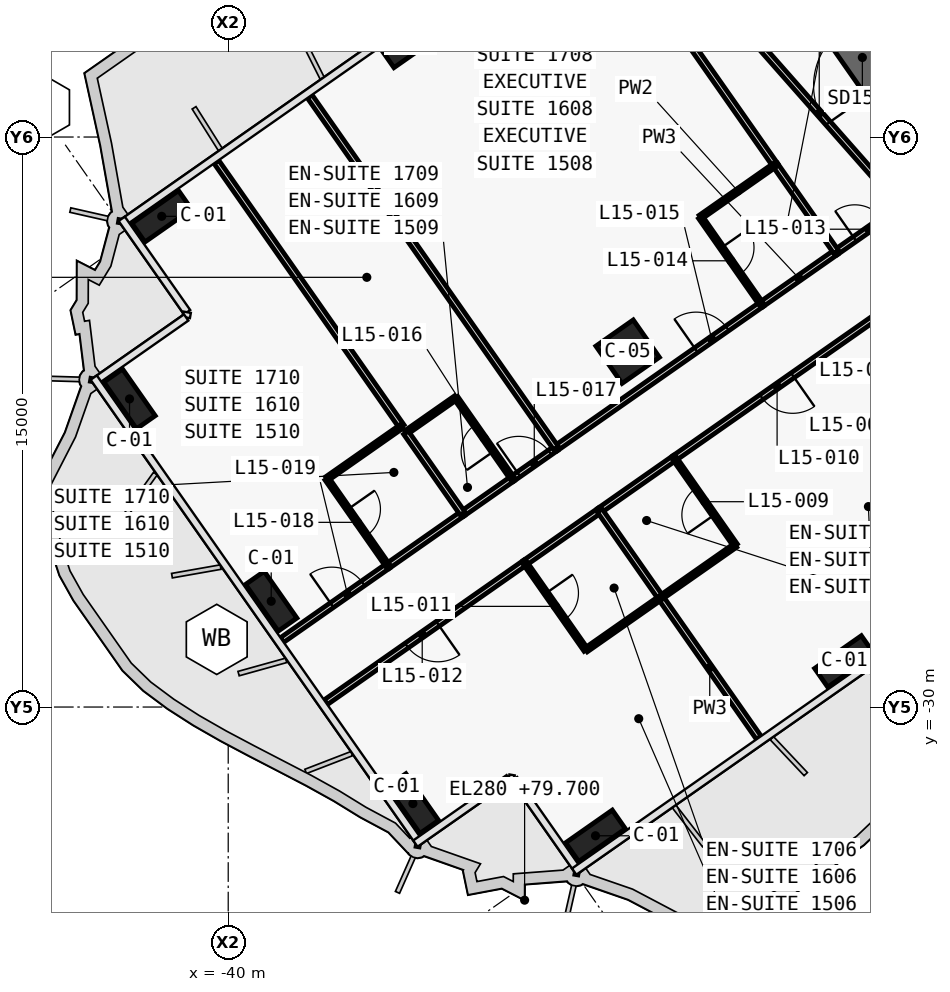
"""IFC4 building model, lengths in metres.
Left out: names, types, materials, properties, quantities, classifications, styles, units other than length and angle.
Written with IfcOpenShell. Run it as: python <this file> out.ifc"""

import sys

from ifc_helpers import new_model, si_unit, direction, frame, frame_2d, origin, origin_2d, place, context, subcontext, project, spatial, polyline, rectangle, outline, extrude, element, fill, save


model = new_model("IFC4")
c1 = context("Model", 3, precision=1e-05, world=origin(), true_north=direction((0.0, 1.0)))
c2 = subcontext(c1, "Body", "Model", "MODEL_VIEW")
j1 = project(units=[si_unit("LENGTHUNIT", "METRE"), si_unit("PLANEANGLEUNIT", "RADIAN")], contexts=[c1])
p1 = place(None, origin())
s1 = spatial("IfcSite", under=j1, at=p1, CompositionType="ELEMENT")
p2 = place(p1, origin())
s2 = spatial("IfcBuilding", under=s1, at=p2, CompositionType="ELEMENT")
p3 = place(p2, frame((0.0, 0.0, 79.7)))
s3 = spatial("IfcBuildingStorey", under=s2, at=p3, CompositionType="ELEMENT", Elevation=79.7)
p4 = place(p3, frame((-21.708, -15.2, 0.0), z_axis=(0.0, 0.0, 1.0), x_axis=(-0.573576324356, 0.819152122709, 0.0)))
e1 = element("IfcWall", 1, at=p4, inside=s3, PredefinedType="SHEAR", context=c2, shape_type="SweptSolid", body=[
    extrude(outline(polyline([(0.0, 0.5), (0.0, -0.5), (9.2, -0.5), (9.2, 0.5), (0.0, 0.5)])), origin(), (0.0, 0.0, 1.0), 3.6),
])
p5 = place(p4, frame((6.1, 0.0, 0.0)))
e2 = element("IfcOpeningElement", 2, at=p5, cuts=e1, PredefinedType="OPENING", context=c2, shape_type="SweptSolid", body=[
    extrude(rectangle(XDim=1.8, YDim=2.1, at=frame_2d((0.9, 1.05))), frame((0.0, 0.51, 0.0), z_axis=(0.0, -1.0, 0.0), x_axis=(1.0, 0.0, 0.0)), (0.0, 0.0, 1.0), 1.02),
])
p6 = place(p4, frame((1.9, 0.0, 0.0)))
e3 = element("IfcOpeningElement", 3, at=p6, cuts=e1, PredefinedType="OPENING", context=c2, shape_type="SweptSolid", body=[
    extrude(rectangle(XDim=1.8, YDim=2.1, at=frame_2d((0.9, 1.05))), frame((0.0, 0.51, 0.0), z_axis=(0.0, -1.0, 0.0), x_axis=(1.0, 0.0, 0.0)), (0.0, 0.0, 1.0), 1.02),
])
for number, where, z_axis, x_axis in (
    (4, (-23.782, -28.799, 0.0), (0.0, 0.0, 1.0), (-0.819, -0.574, 0.0)),
    (5, (-30.336, -33.388, 0.0), (0.0, 0.0, 1.0), (-0.819, -0.574, 0.0)),
    (6, (-35.197, -12.498, 0.0), (0.0, 0.0, 1.0), (-0.819, -0.574, 0.0)),
    (7, (-41.75, -17.087, 0.0), (0.0, 0.0, 1.0), (-0.819, -0.574, 0.0)),
    (8, (-35.14, -32.541, 0.0), (0.0, 0.0, 1.0), (-0.574, 0.819, 0.0)),
    (9, (-38.869, -27.216, 0.0), (0.0, 0.0, 1.0), (-0.574, 0.819, 0.0)),
    (10, (-42.597, -21.892, 0.0), (0.0, 0.0, 1.0), (-0.574, 0.819, 0.0)),
):
    element("IfcColumn", number, at=place(p3, frame(where, z_axis=z_axis, x_axis=x_axis)), inside=s3, PredefinedType="COLUMN", context=c2, shape_type="SweptSolid", body=[
        extrude(rectangle(XDim=1.5, YDim=0.6, at=origin_2d()), origin(), (0.0, 0.0, 1.0), 3.6),
    ])
p7 = place(p3, frame((-29.49, -20.649, 0.0), z_axis=(0.0, 0.0, 1.0), x_axis=(-0.819152044289, -0.573576436351, 0.0)))
e11 = element("IfcColumn", 11, at=p7, inside=s3, PredefinedType="COLUMN", context=c2, shape_type="SweptSolid", body=[
    extrude(rectangle(XDim=1.2, YDim=1.2, at=origin_2d()), origin(), (0.0, 0.0, 1.0), 3.6),
])
p8 = place(p3, frame((-24.003, -18.028, 0.0), z_axis=(0.0, 0.0, 1.0), x_axis=(0.819160859995, 0.573563846013, 0.0)))
e12 = element("IfcWall", 12, at=p8, inside=s3, PredefinedType="PARTITIONING", context=c2, shape_type="SweptSolid", body=[
    extrude(rectangle(XDim=2.098, YDim=0.15, at=frame_2d((1.049, 0.0))), origin(), (0.0, 0.0, 1.0), 3.32),
])
p9 = place(p8, frame((0.599, 0.0, 0.0)))
e13 = element("IfcOpeningElement", 13, at=p9, cuts=e12, PredefinedType="OPENING", context=c2, shape_type="SweptSolid", body=[
    extrude(rectangle(XDim=0.9, YDim=2.1, at=frame_2d((0.45, 1.05))), frame((0.0, 0.085, 0.0), z_axis=(0.0, -1.0, 0.0), x_axis=(1.0, 0.0, 0.0)), (0.0, 0.0, 1.0), 0.17),
])
p10 = place(p3, frame((-31.375, -23.19, 0.0), z_axis=(0.0, 0.0, 1.0), x_axis=(0.819171118839, 0.573549194106, 0.0)))
e14 = element("IfcWall", 14, at=p10, inside=s3, PredefinedType="PARTITIONING", context=c2, shape_type="SweptSolid", body=[
    extrude(rectangle(XDim=6.603, YDim=0.15, at=frame_2d((3.302, 0.0))), origin(), (0.0, 0.0, 1.0), 2.6),
])
p11 = place(p10, frame((4.502, 0.0, 0.0)))
e15 = element("IfcOpeningElement", 15, at=p11, cuts=e14, PredefinedType="OPENING", context=c2, shape_type="SweptSolid", body=[
    extrude(rectangle(XDim=1.0, YDim=2.1, at=frame_2d((0.5, 1.05))), frame((0.0, 0.085, 0.0), z_axis=(0.0, -1.0, 0.0), x_axis=(1.0, 0.0, 0.0)), (0.0, 0.0, 1.0), 0.17),
])
p12 = place(p3, frame((-25.969, -19.404, 0.0), z_axis=(0.0, 0.0, 1.0), x_axis=(0.819146032251, 0.573585022335, 0.0)))
e16 = element("IfcWall", 16, at=p12, inside=s3, PredefinedType="PARTITIONING", context=c2, shape_type="SweptSolid", body=[
    extrude(rectangle(XDim=2.404, YDim=0.15, at=frame_2d((1.202, 0.0))), origin(), (0.0, 0.0, 1.0), 3.32),
])
p13 = place(p3, frame((-32.521, -23.992, 0.0), z_axis=(0.0, 0.0, 1.0), x_axis=(0.819199220913, 0.573509055252, 0.0)))
e17 = element("IfcWall", 17, at=p13, inside=s3, PredefinedType="PARTITIONING", context=c2, shape_type="SweptSolid", body=[
    extrude(rectangle(XDim=1.403, YDim=0.15, at=frame_2d((0.702, 0.0))), origin(), (0.0, 0.0, 1.0), 3.32),
])
p14 = place(p13, frame((0.201, 0.0, 0.0)))
e18 = element("IfcOpeningElement", 18, at=p14, cuts=e17, PredefinedType="OPENING", context=c2, shape_type="SweptSolid", body=[
    extrude(rectangle(XDim=1.0, YDim=2.1, at=frame_2d((0.5, 1.05))), frame((0.0, 0.085, 0.0), z_axis=(0.0, -1.0, 0.0), x_axis=(1.0, 0.0, 0.0)), (0.0, 0.0, 1.0), 0.17),
])
p15 = place(p3, frame((-33.833, -24.91, 0.0), z_axis=(0.0, 0.0, 1.0), x_axis=(0.819189013667, 0.573523634986, 0.0)))
e19 = element("IfcWall", 19, at=p15, inside=s3, PredefinedType="PARTITIONING", context=c2, shape_type="SweptSolid", body=[
    extrude(rectangle(XDim=1.604, YDim=0.15, at=frame_2d((0.802, 0.0))), origin(), (0.0, 0.0, 1.0), 3.32),
])
p16 = place(p3, frame((-38.582, -28.236, 0.0), z_axis=(0.0, 0.0, 1.0), x_axis=(0.819154345195, 0.573573150303, 0.0)))
e20 = element("IfcWall", 20, at=p16, inside=s3, PredefinedType="PARTITIONING", context=c2, shape_type="SweptSolid", body=[
    extrude(rectangle(XDim=3.401, YDim=0.15, at=frame_2d((1.7, 0.0))), origin(), (0.0, 0.0, 1.0), 2.5),
])
p17 = place(p16, frame((1.6, 0.0, 0.0)))
e21 = element("IfcOpeningElement", 21, at=p17, cuts=e20, PredefinedType="OPENING", context=c2, shape_type="SweptSolid", body=[
    extrude(rectangle(XDim=1.0, YDim=2.1, at=frame_2d((0.5, 1.05))), frame((0.0, 0.085, 0.0), z_axis=(0.0, -1.0, 0.0), x_axis=(1.0, 0.0, 0.0)), (0.0, 0.0, 1.0), 0.17),
])
p18 = place(p3, frame((-35.798, -26.287, 0.0), z_axis=(0.0, 0.0, 1.0), x_axis=(0.819146032251, 0.573585022335, 0.0)))
e22 = element("IfcWall", 22, at=p18, inside=s3, PredefinedType="PARTITIONING", context=c2, shape_type="SweptSolid", body=[
    extrude(rectangle(XDim=2.404, YDim=0.15, at=frame_2d((1.202, 0.0))), origin(), (0.0, 0.0, 1.0), 3.32),
])
p19 = place(p3, frame((-22.852, -19.664, 0.0), z_axis=(0.0, 0.0, 1.0), x_axis=(-0.819141582452, -0.573591377113, 0.0)))
e23 = element("IfcWall", 23, at=p19, inside=s3, PredefinedType="PARTITIONING", context=c2, shape_type="SweptSolid", body=[
    extrude(rectangle(XDim=6.603, YDim=0.15, at=frame_2d((3.301, 0.0))), origin(), (0.0, 0.0, 1.0), 2.6),
])
p20 = place(p19, frame((2.802, 0.0, 0.0)))
e24 = element("IfcOpeningElement", 24, at=p20, cuts=e23, PredefinedType="OPENING", context=c2, shape_type="SweptSolid", body=[
    extrude(rectangle(XDim=1.0, YDim=2.1, at=frame_2d((0.5, 1.05))), frame((0.0, 0.085, 0.0), z_axis=(0.0, -1.0, 0.0), x_axis=(1.0, 0.0, 0.0)), (0.0, 0.0, 1.0), 0.17),
])
p21 = place(p3, frame((-28.259, -23.449, 0.0), z_axis=(0.0, 0.0, 1.0), x_axis=(-0.819146032251, -0.573585022335, 0.0)))
e25 = element("IfcWall", 25, at=p21, inside=s3, PredefinedType="PARTITIONING", context=c2, shape_type="SweptSolid", body=[
    extrude(rectangle(XDim=2.404, YDim=0.15, at=frame_2d((1.202, 0.0))), origin(), (0.0, 0.0, 1.0), 3.32),
])
p22 = place(p3, frame((-32.191, -26.203, 0.0), z_axis=(0.0, 0.0, 1.0), x_axis=(-0.819140526837, -0.573592884626, 0.0)))
e26 = element("IfcWall", 26, at=p22, inside=s3, PredefinedType="PARTITIONING", context=c2, shape_type="SweptSolid", body=[
    extrude(rectangle(XDim=6.401, YDim=0.15, at=frame_2d((3.201, 0.0))), origin(), (0.0, 0.0, 1.0), 2.5),
])
p23 = place(p22, frame((2.801, 0.0, 0.0)))
e27 = element("IfcOpeningElement", 27, at=p23, cuts=e26, PredefinedType="OPENING", context=c2, shape_type="SweptSolid", body=[
    extrude(rectangle(XDim=1.0, YDim=2.1, at=frame_2d((0.5, 1.05))), frame((0.0, 0.085, 0.0), z_axis=(0.0, -1.0, 0.0), x_axis=(1.0, 0.0, 0.0)), (0.0, 0.0, 1.0), 0.17),
])
p24 = place(p3, frame((-30.225, -24.826, 0.0), z_axis=(0.0, 0.0, 1.0), x_axis=(-0.819146032251, -0.573585022335, 0.0)))
e28 = element("IfcWall", 28, at=p24, inside=s3, PredefinedType="PARTITIONING", context=c2, shape_type="SweptSolid", body=[
    extrude(rectangle(XDim=2.404, YDim=0.15, at=frame_2d((1.202, 0.0))), origin(), (0.0, 0.0, 1.0), 3.32),
])
p25 = place(p3, frame((-22.284, -16.827, 0.0), z_axis=(0.0, 0.0, 1.0), x_axis=(-0.661545117561, 0.749905365651, 0.0)))
e29 = element("IfcWall", 29, at=p25, inside=s3, PredefinedType="PARTITIONING", context=c2, shape_type="SweptSolid", body=[
    extrude(rectangle(XDim=6.543, YDim=0.15, at=frame_2d((3.271, 0.0))), origin(), (0.0, 0.0, 1.0), 2.6),
])
p26 = place(p3, frame((-25.606, -15.734, 0.0), z_axis=(0.0, 0.0, 1.0), x_axis=(-0.573576058406, 0.819152308929, 0.0)))
e30 = element("IfcWall", 30, at=p26, inside=s3, PredefinedType="PARTITIONING", context=c2, shape_type="SweptSolid", body=[
    extrude(rectangle(XDim=8.501, YDim=0.15, at=frame_2d((4.25, 0.0))), origin(), (0.0, 0.0, 1.0), 2.6),
])
p27 = place(p3, frame((-24.001, -18.026, 0.0), z_axis=(0.0, 0.0, 1.0), x_axis=(-0.573596837309, 0.819137759006, 0.0)))
e31 = element("IfcWall", 31, at=p27, inside=s3, PredefinedType="PARTITIONING", context=c2, shape_type="SweptSolid", body=[
    extrude(rectangle(XDim=2.802, YDim=0.15, at=frame_2d((1.401, 0.0))), origin(), (0.0, 0.0, 1.0), 2.6),
])
p28 = place(p3, frame((-25.608, -15.732, 0.0), z_axis=(0.0, 0.0, 1.0), x_axis=(-0.819107643868, -0.573639841501, 0.0)))
e32 = element("IfcWall", 32, at=p28, inside=s3, PredefinedType="PARTITIONING", context=c2, shape_type="SweptSolid", body=[
    extrude(rectangle(XDim=2.4, YDim=0.12, at=frame_2d((1.2, 0.0))), origin(), (0.0, 0.0, 1.0), 3.32),
])
p29 = place(p3, frame((-27.574, -17.11, 0.0), z_axis=(0.0, 0.0, 1.0), x_axis=(0.573591086599, -0.819141785879, 0.0)))
e33 = element("IfcWall", 33, at=p29, inside=s3, PredefinedType="PARTITIONING", context=c2, shape_type="SweptSolid", body=[
    extrude(rectangle(XDim=2.8, YDim=0.12, at=frame_2d((1.4, 0.0))), origin(), (0.0, 0.0, 1.0), 2.6),
])
p30 = place(p29, frame((0.975, 0.0, 0.0)))
e34 = element("IfcOpeningElement", 34, at=p30, cuts=e33, PredefinedType="OPENING", context=c2, shape_type="SweptSolid", body=[
    extrude(rectangle(XDim=0.85, YDim=2.05, at=frame_2d((0.425, 1.025))), frame((0.0, 0.07, 0.0), z_axis=(0.0, -1.0, 0.0), x_axis=(1.0, 0.0, 0.0)), (0.0, 0.0, 1.0), 0.14),
])
p31 = place(p3, frame((-31.373, -23.189, 0.0), z_axis=(0.0, 0.0, 1.0), x_axis=(-0.573571089604, 0.819155788095, 0.0)))
e35 = element("IfcWall", 35, at=p31, inside=s3, PredefinedType="PARTITIONING", context=c2, shape_type="SweptSolid", body=[
    extrude(rectangle(XDim=11.3, YDim=0.15, at=frame_2d((5.65, 0.0))), origin(), (0.0, 0.0, 1.0), 2.5),
])
p32 = place(p3, frame((-32.519, -23.991, 0.0), z_axis=(0.0, 0.0, 1.0), x_axis=(-0.573537965655, 0.819178980414, 0.0)))
e36 = element("IfcWall", 36, at=p32, inside=s3, PredefinedType="PARTITIONING", context=c2, shape_type="SweptSolid", body=[
    extrude(rectangle(XDim=2.6, YDim=0.12, at=frame_2d((1.3, 0.0))), origin(), (0.0, 0.0, 1.0), 2.6),
])
p33 = place(p32, frame((0.875, 0.0, 0.0)))
e37 = element("IfcOpeningElement", 37, at=p33, cuts=e36, PredefinedType="OPENING", context=c2, shape_type="SweptSolid", body=[
    extrude(rectangle(XDim=0.85, YDim=2.05, at=frame_2d((0.425, 1.025))), frame((0.0, 0.07, 0.0), z_axis=(0.0, -1.0, 0.0), x_axis=(1.0, 0.0, 0.0)), (0.0, 0.0, 1.0), 0.14),
])
p34 = place(p3, frame((-34.012, -21.861, 0.0), z_axis=(0.0, 0.0, 1.0), x_axis=(-0.81918174131, -0.573534022273, 0.0)))
e38 = element("IfcWall", 38, at=p34, inside=s3, PredefinedType="PARTITIONING", context=c2, shape_type="SweptSolid", body=[
    extrude(rectangle(XDim=1.6, YDim=0.12, at=frame_2d((0.8, 0.0))), origin(), (0.0, 0.0, 1.0), 3.32),
])
p35 = place(p3, frame((-35.436, -22.617, 0.0), z_axis=(0.0, 0.0, 1.0), x_axis=(-0.57356256513, 0.819161756848, 0.0)))
e39 = element("IfcWall", 39, at=p35, inside=s3, PredefinedType="PARTITIONING", context=c2, shape_type="SweptSolid", body=[
    extrude(rectangle(XDim=8.501, YDim=0.15, at=frame_2d((4.25, 0.0))), origin(), (0.0, 0.0, 1.0), 2.5),
])
p36 = place(p3, frame((-33.831, -24.909, 0.0), z_axis=(0.0, 0.0, 1.0), x_axis=(-0.573537965655, 0.819178980414, 0.0)))
e40 = element("IfcWall", 40, at=p36, inside=s3, PredefinedType="PARTITIONING", context=c2, shape_type="SweptSolid", body=[
    extrude(rectangle(XDim=2.6, YDim=0.15, at=frame_2d((1.3, 0.0))), origin(), (0.0, 0.0, 1.0), 2.6),
])
p37 = place(p3, frame((-35.438, -22.615, 0.0), z_axis=(0.0, 0.0, 1.0), x_axis=(-0.819155442668, -0.573571582932, 0.0)))
e41 = element("IfcWall", 41, at=p37, inside=s3, PredefinedType="PARTITIONING", context=c2, shape_type="SweptSolid", body=[
    extrude(rectangle(XDim=2.4, YDim=0.12, at=frame_2d((1.2, 0.0))), origin(), (0.0, 0.0, 1.0), 3.32),
])
p38 = place(p3, frame((-37.404, -23.993, 0.0), z_axis=(0.0, 0.0, 1.0), x_axis=(0.573550118428, -0.819170471667, 0.0)))
e42 = element("IfcWall", 42, at=p38, inside=s3, PredefinedType="PARTITIONING", context=c2, shape_type="SweptSolid", body=[
    extrude(rectangle(XDim=2.8, YDim=0.12, at=frame_2d((1.4, 0.0))), origin(), (0.0, 0.0, 1.0), 2.6),
])
p39 = place(p38, frame((0.975, 0.0, 0.0)))
e43 = element("IfcOpeningElement", 43, at=p39, cuts=e42, PredefinedType="OPENING", context=c2, shape_type="SweptSolid", body=[
    extrude(rectangle(XDim=0.85, YDim=2.05, at=frame_2d((0.425, 1.025))), frame((0.0, 0.07, 0.0), z_axis=(0.0, -1.0, 0.0), x_axis=(1.0, 0.0, 0.0)), (0.0, 0.0, 1.0), 0.14),
])
p40 = place(p3, frame((-28.62, -27.121, 0.0), z_axis=(0.0, 0.0, 1.0), x_axis=(0.819188907105, 0.573523787192, 0.0)))
e44 = element("IfcWall", 44, at=p40, inside=s3, PredefinedType="PARTITIONING", context=c2, shape_type="SweptSolid", body=[
    extrude(rectangle(XDim=2.4, YDim=0.12, at=frame_2d((1.2, 0.0))), origin(), (0.0, 0.0, 1.0), 3.32),
])
p41 = place(p3, frame((-26.653, -25.743, 0.0), z_axis=(0.0, 0.0, 1.0), x_axis=(-0.573608623498, 0.819129505664, 0.0)))
e45 = element("IfcWall", 45, at=p41, inside=s3, PredefinedType="PARTITIONING", context=c2, shape_type="SweptSolid", body=[
    extrude(rectangle(XDim=2.8, YDim=0.12, at=frame_2d((1.4, 0.0))), origin(), (0.0, 0.0, 1.0), 3.32),
])
p42 = place(p41, frame((0.975, 0.0, 0.0)))
e46 = element("IfcOpeningElement", 46, at=p42, cuts=e45, PredefinedType="OPENING", context=c2, shape_type="SweptSolid", body=[
    extrude(rectangle(XDim=0.85, YDim=2.05, at=frame_2d((0.425, 1.025))), frame((0.0, 0.07, 0.0), z_axis=(0.0, -1.0, 0.0), x_axis=(1.0, 0.0, 0.0)), (0.0, 0.0, 1.0), 0.14),
])
p43 = place(p3, frame((-26.039, -30.807, 0.0), z_axis=(0.0, 0.0, 1.0), x_axis=(-0.573589807488, 0.819142681555, 0.0)))
e47 = element("IfcWall", 47, at=p43, inside=s3, PredefinedType="PARTITIONING", context=c2, shape_type="SweptSolid", body=[
    extrude(rectangle(XDim=4.499, YDim=0.15, at=frame_2d((2.25, 0.0))), origin(), (0.0, 0.0, 1.0), 2.5),
])
p44 = place(p3, frame((-28.62, -27.121, 0.0), z_axis=(0.0, 0.0, 1.0), x_axis=(-0.573608623498, 0.819129505664, 0.0)))
e48 = element("IfcWall", 48, at=p44, inside=s3, PredefinedType="PARTITIONING", context=c2, shape_type="SweptSolid", body=[
    extrude(rectangle(XDim=2.8, YDim=0.15, at=frame_2d((1.4, 0.0))), origin(), (0.0, 0.0, 1.0), 3.32),
])
p45 = place(p3, frame((-32.193, -26.204, 0.0), z_axis=(0.0, 0.0, 1.0), x_axis=(0.573608623498, -0.819129505664, 0.0)))
e49 = element("IfcWall", 49, at=p45, inside=s3, PredefinedType="PARTITIONING", context=c2, shape_type="SweptSolid", body=[
    extrude(rectangle(XDim=2.8, YDim=0.12, at=frame_2d((1.4, 0.0))), origin(), (0.0, 0.0, 1.0), 3.32),
])
p46 = place(p45, frame((0.975, 0.0, 0.0)))
e50 = element("IfcOpeningElement", 50, at=p46, cuts=e49, PredefinedType="OPENING", context=c2, shape_type="SweptSolid", body=[
    extrude(rectangle(XDim=0.85, YDim=2.05, at=frame_2d((0.425, 1.025))), frame((0.0, 0.07, 0.0), z_axis=(0.0, -1.0, 0.0), x_axis=(1.0, 0.0, 0.0)), (0.0, 0.0, 1.0), 0.14),
])
p47 = place(p3, frame((-30.586, -28.498, 0.0), z_axis=(0.0, 0.0, 1.0), x_axis=(0.819141114317, 0.573592045652, 0.0)))
e51 = element("IfcWall", 51, at=p47, inside=s3, PredefinedType="PARTITIONING", context=c2, shape_type="SweptSolid", body=[
    extrude(rectangle(XDim=2.4, YDim=0.12, at=frame_2d((1.2, 0.0))), origin(), (0.0, 0.0, 1.0), 3.32),
])
p48 = place(p6, origin())
e52 = element("IfcDoor", 52, at=p48, inside=s3, OperationType="DOUBLE_DOOR_SINGLE_SWING", PredefinedType="DOOR", context=c2, shape_type="SweptSolid", body=[
    extrude(rectangle(XDim=1.8, YDim=2.1, at=frame_2d((0.9, 1.05))), frame((0.0, 0.025, 0.0), z_axis=(0.0, -1.0, 0.0), x_axis=(1.0, 0.0, 0.0)), (0.0, 0.0, 1.0), 0.05),
])
fill(e3, e52)
p49 = place(p42, origin())
e53 = element("IfcDoor", 53, at=p49, inside=s3, OperationType="SINGLE_SWING_LEFT", PredefinedType="DOOR", context=c2, shape_type="SweptSolid", body=[
    extrude(rectangle(XDim=0.85, YDim=2.05, at=frame_2d((0.425, 1.025))), frame((0.0, 0.025, 0.0), z_axis=(0.0, -1.0, 0.0), x_axis=(1.0, 0.0, 0.0)), (0.0, 0.0, 1.0), 0.05),
])
fill(e46, e53)
p50 = place(p20, origin())
e54 = element("IfcDoor", 54, at=p50, inside=s3, OperationType="SINGLE_SWING_LEFT", PredefinedType="DOOR", context=c2, shape_type="SweptSolid", body=[
    extrude(rectangle(XDim=1.0, YDim=2.1, at=frame_2d((0.5, 1.05))), frame((0.0, 0.025, 0.0), z_axis=(0.0, -1.0, 0.0), x_axis=(1.0, 0.0, 0.0)), (0.0, 0.0, 1.0), 0.05),
])
fill(e24, e54)
p51 = place(p46, origin())
e55 = element("IfcDoor", 55, at=p51, inside=s3, OperationType="SINGLE_SWING_LEFT", PredefinedType="DOOR", context=c2, shape_type="SweptSolid", body=[
    extrude(rectangle(XDim=0.85, YDim=2.05, at=frame_2d((0.425, 1.025))), frame((0.0, 0.025, 0.0), z_axis=(0.0, -1.0, 0.0), x_axis=(1.0, 0.0, 0.0)), (0.0, 0.0, 1.0), 0.05),
])
fill(e50, e55)
p52 = place(p23, origin())
e56 = element("IfcDoor", 56, at=p52, inside=s3, OperationType="SINGLE_SWING_LEFT", PredefinedType="DOOR", context=c2, shape_type="SweptSolid", body=[
    extrude(rectangle(XDim=1.0, YDim=2.1, at=frame_2d((0.5, 1.05))), frame((0.0, 0.025, 0.0), z_axis=(0.0, -1.0, 0.0), x_axis=(1.0, 0.0, 0.0)), (0.0, 0.0, 1.0), 0.05),
])
fill(e27, e56)
p53 = place(p9, origin())
e57 = element("IfcDoor", 57, at=p53, inside=s3, OperationType="SINGLE_SWING_LEFT", PredefinedType="DOOR", context=c2, shape_type="SweptSolid", body=[
    extrude(rectangle(XDim=0.9, YDim=2.1, at=frame_2d((0.45, 1.05))), frame((0.0, 0.025, 0.0), z_axis=(0.0, -1.0, 0.0), x_axis=(1.0, 0.0, 0.0)), (0.0, 0.0, 1.0), 0.05),
])
fill(e13, e57)
p54 = place(p30, origin())
e58 = element("IfcDoor", 58, at=p54, inside=s3, OperationType="SINGLE_SWING_RIGHT", PredefinedType="DOOR", context=c2, shape_type="SweptSolid", body=[
    extrude(rectangle(XDim=0.85, YDim=2.05, at=frame_2d((0.425, 1.025))), frame((0.0, 0.025, 0.0), z_axis=(0.0, -1.0, 0.0), x_axis=(1.0, 0.0, 0.0)), (0.0, 0.0, 1.0), 0.05),
])
fill(e34, e58)
p55 = place(p11, origin())
e59 = element("IfcDoor", 59, at=p55, inside=s3, OperationType="SINGLE_SWING_LEFT", PredefinedType="DOOR", context=c2, shape_type="SweptSolid", body=[
    extrude(rectangle(XDim=1.0, YDim=2.1, at=frame_2d((0.5, 1.05))), frame((0.0, 0.025, 0.0), z_axis=(0.0, -1.0, 0.0), x_axis=(1.0, 0.0, 0.0)), (0.0, 0.0, 1.0), 0.05),
])
fill(e15, e59)
p56 = place(p33, origin())
e60 = element("IfcDoor", 60, at=p56, inside=s3, OperationType="SINGLE_SWING_LEFT", PredefinedType="DOOR", context=c2, shape_type="SweptSolid", body=[
    extrude(rectangle(XDim=0.85, YDim=2.05, at=frame_2d((0.425, 1.025))), frame((0.0, 0.025, 0.0), z_axis=(0.0, -1.0, 0.0), x_axis=(1.0, 0.0, 0.0)), (0.0, 0.0, 1.0), 0.05),
])
fill(e37, e60)
p57 = place(p14, origin())
e61 = element("IfcDoor", 61, at=p57, inside=s3, OperationType="SINGLE_SWING_RIGHT", PredefinedType="DOOR", context=c2, shape_type="SweptSolid", body=[
    extrude(rectangle(XDim=1.0, YDim=2.1, at=frame_2d((0.5, 1.05))), frame((0.0, 0.025, 0.0), z_axis=(0.0, -1.0, 0.0), x_axis=(1.0, 0.0, 0.0)), (0.0, 0.0, 1.0), 0.05),
])
fill(e18, e61)
p58 = place(p39, origin())
e62 = element("IfcDoor", 62, at=p58, inside=s3, OperationType="SINGLE_SWING_RIGHT", PredefinedType="DOOR", context=c2, shape_type="SweptSolid", body=[
    extrude(rectangle(XDim=0.85, YDim=2.05, at=frame_2d((0.425, 1.025))), frame((0.0, 0.025, 0.0), z_axis=(0.0, -1.0, 0.0), x_axis=(1.0, 0.0, 0.0)), (0.0, 0.0, 1.0), 0.05),
])
fill(e43, e62)
p59 = place(p17, origin())
e63 = element("IfcDoor", 63, at=p59, inside=s3, OperationType="SINGLE_SWING_LEFT", PredefinedType="DOOR", context=c2, shape_type="SweptSolid", body=[
    extrude(rectangle(XDim=1.0, YDim=2.1, at=frame_2d((0.5, 1.05))), frame((0.0, 0.025, 0.0), z_axis=(0.0, -1.0, 0.0), x_axis=(1.0, 0.0, 0.0)), (0.0, 0.0, 1.0), 0.05),
])
fill(e21, e63)
save(model, sys.argv[1])
